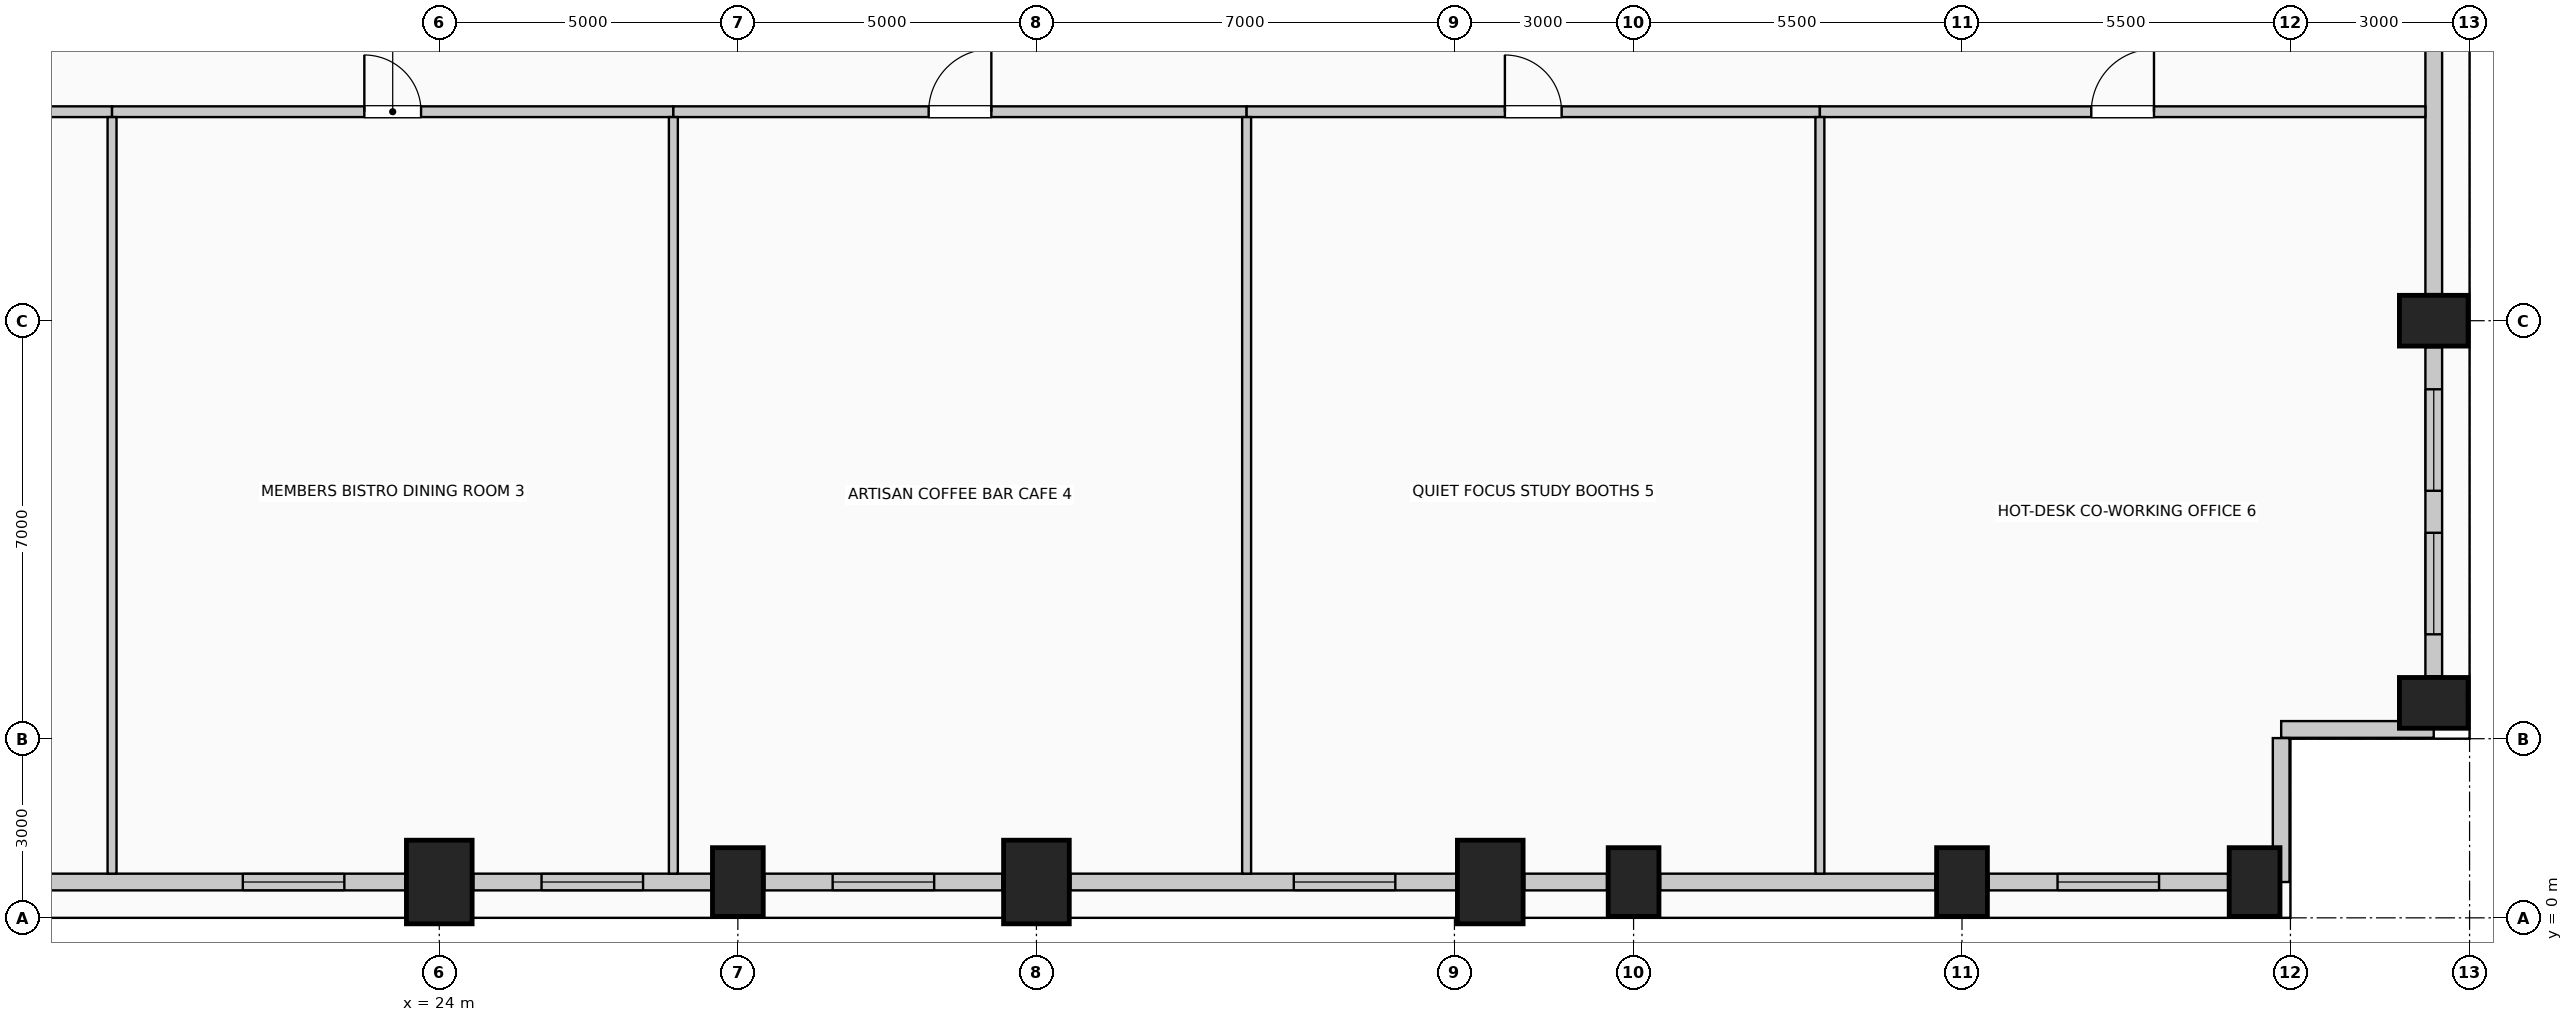
"""IFC4 building model, lengths in metres.
Left out: names, types, materials, properties, quantities, classifications, styles, units other than length and angle.
Written with IfcOpenShell. Run it as: python <this file> out.ifc"""

import sys

from ifc_helpers import new_model, si_unit, direction, frame, frame_2d, origin, origin_2d, place, context, subcontext, project, spatial, rectangle, extrude, element, fill, save


model = new_model("IFC4")
c1 = context("Model", 3, precision=1e-05, world=origin(), true_north=direction((0.0, 1.0)))
c2 = subcontext(c1, "Body", "Model", "MODEL_VIEW")
j1 = project(units=[si_unit("LENGTHUNIT", "METRE"), si_unit("PLANEANGLEUNIT", "RADIAN")], contexts=[c1])
p1 = place(None, origin())
s1 = spatial("IfcSite", under=j1, at=p1, CompositionType="ELEMENT")
p2 = place(p1, origin())
s2 = spatial("IfcBuilding", under=s1, at=p2, CompositionType="ELEMENT")
p3 = place(p2, frame((0.0, 0.0, 104.6)))
s3 = spatial("IfcBuildingStorey", under=s2, at=p3, CompositionType="ELEMENT", Elevation=104.6)
p4 = place(p3, frame((24.0, 0.6, 0.0), z_axis=(0.0, 0.0, 1.0), x_axis=(1.0, 0.0, 0.0)))
e1 = element("IfcColumn", 1, at=p4, inside=s3, PredefinedType="COLUMN", context=c2, shape_type="SweptSolid", body=[
    extrude(rectangle(XDim=1.1, YDim=1.4, at=origin_2d()), origin(), (0.0, 0.0, 1.0), 4.0),
])
p5 = place(p3, frame((29.0, 0.6, 0.0), z_axis=(0.0, 0.0, 1.0), x_axis=(1.0, 0.0, 0.0)))
e2 = element("IfcColumn", 2, at=p5, inside=s3, PredefinedType="COLUMN", context=c2, shape_type="SweptSolid", body=[
    extrude(rectangle(XDim=0.85, YDim=1.15, at=origin_2d()), origin(), (0.0, 0.0, 1.0), 4.0),
])
for number, where, z_axis, x_axis in (
    (3, (34.0, 0.6, 0.0), (0.0, 0.0, 1.0), (1.0, 0.0, 0.0)),
    (4, (41.6, 0.6, 0.0), (0.0, 0.0, 1.0), (1.0, 0.0, 0.0)),
):
    element("IfcColumn", number, at=place(p3, frame(where, z_axis=z_axis, x_axis=x_axis)), inside=s3, PredefinedType="COLUMN", context=c2, shape_type="SweptSolid", body=[
        extrude(rectangle(XDim=1.1, YDim=1.4, at=origin_2d()), origin(), (0.0, 0.0, 1.0), 4.0),
    ])
for number, where, z_axis, x_axis in (
    (5, (44.0, 0.6, 0.0), (0.0, 0.0, 1.0), (1.0, 0.0, 0.0)),
    (6, (49.5, 0.6, 0.0), (0.0, 0.0, 1.0), (1.0, 0.0, 0.0)),
    (7, (54.4, 0.6, 0.0), (0.0, 0.0, 1.0), (1.0, 0.0, 0.0)),
    (8, (57.4, 3.6, 0.0), (0.0, 0.0, 1.0), (0.0, 1.0, 0.0)),
    (9, (57.4, 10.0, 0.0), (0.0, 0.0, 1.0), (0.0, 1.0, 0.0)),
):
    element("IfcColumn", number, at=place(p3, frame(where, z_axis=z_axis, x_axis=x_axis)), inside=s3, PredefinedType="COLUMN", context=c2, shape_type="SweptSolid", body=[
        extrude(rectangle(XDim=0.85, YDim=1.15, at=origin_2d()), origin(), (0.0, 0.0, 1.0), 4.0),
    ])
p6 = place(p3, frame((23.43, 0.6, 0.0), z_axis=(0.0, 0.0, 1.0), x_axis=(-1.0, 0.0, 0.0)))
e10 = element("IfcWall", 10, at=p6, inside=s3, PredefinedType="SOLIDWALL", context=c2, shape_type="SweptSolid", body=[
    extrude(rectangle(XDim=6.46, YDim=0.28, at=frame_2d((3.23, 0.0))), origin(), (0.0, 0.0, 1.0), 2.875),
])
p7 = place(p6, frame((1.02, 0.0, 0.5)))
e11 = element("IfcOpeningElement", 11, at=p7, cuts=e10, PredefinedType="OPENING", context=c2, shape_type="SweptSolid", body=[
    extrude(rectangle(XDim=1.7, YDim=1.95, at=frame_2d((0.85, 0.975))), frame((0.0, 0.15, 0.0), z_axis=(0.0, -1.0, 0.0), x_axis=(1.0, 0.0, 0.0)), (0.0, 0.0, 1.0), 0.3),
])
p8 = place(p3, frame((28.555, 0.6, 0.0), z_axis=(0.0, 0.0, 1.0), x_axis=(-1.0, 0.0, 0.0)))
e12 = element("IfcWall", 12, at=p8, inside=s3, PredefinedType="SOLIDWALL", context=c2, shape_type="SweptSolid", body=[
    extrude(rectangle(XDim=3.985, YDim=0.28, at=frame_2d((1.992, 0.0))), origin(), (0.0, 0.0, 1.0), 2.875),
])
p9 = place(p8, frame((1.143, 0.0, 0.5)))
e13 = element("IfcOpeningElement", 13, at=p9, cuts=e12, PredefinedType="OPENING", context=c2, shape_type="SweptSolid", body=[
    extrude(rectangle(XDim=1.7, YDim=1.95, at=frame_2d((0.85, 0.975))), frame((0.0, 0.15, 0.0), z_axis=(0.0, -1.0, 0.0), x_axis=(1.0, 0.0, 0.0)), (0.0, 0.0, 1.0), 0.3),
])
p10 = place(p3, frame((33.43, 0.6, 0.0), z_axis=(0.0, 0.0, 1.0), x_axis=(-1.0, 0.0, 0.0)))
e14 = element("IfcWall", 14, at=p10, inside=s3, PredefinedType="SOLIDWALL", context=c2, shape_type="SweptSolid", body=[
    extrude(rectangle(XDim=3.985, YDim=0.28, at=frame_2d((1.992, 0.0))), origin(), (0.0, 0.0, 1.0), 2.875),
])
p11 = place(p10, frame((1.143, 0.0, 0.5)))
e15 = element("IfcOpeningElement", 15, at=p11, cuts=e14, PredefinedType="OPENING", context=c2, shape_type="SweptSolid", body=[
    extrude(rectangle(XDim=1.7, YDim=1.95, at=frame_2d((0.85, 0.975))), frame((0.0, 0.15, 0.0), z_axis=(0.0, -1.0, 0.0), x_axis=(1.0, 0.0, 0.0)), (0.0, 0.0, 1.0), 0.3),
])
p12 = place(p3, frame((41.03, 0.6, 0.0), z_axis=(0.0, 0.0, 1.0), x_axis=(-1.0, 0.0, 0.0)))
e16 = element("IfcWall", 16, at=p12, inside=s3, PredefinedType="SOLIDWALL", context=c2, shape_type="SweptSolid", body=[
    extrude(rectangle(XDim=6.46, YDim=0.28, at=frame_2d((3.23, 0.0))), origin(), (0.0, 0.0, 1.0), 2.875),
])
p13 = place(p12, frame((1.02, 0.0, 0.5)))
e17 = element("IfcOpeningElement", 17, at=p13, cuts=e16, PredefinedType="OPENING", context=c2, shape_type="SweptSolid", body=[
    extrude(rectangle(XDim=1.7, YDim=1.95, at=frame_2d((0.85, 0.975))), frame((0.0, 0.15, 0.0), z_axis=(0.0, -1.0, 0.0), x_axis=(1.0, 0.0, 0.0)), (0.0, 0.0, 1.0), 0.3),
])
p14 = place(p3, frame((43.555, 0.6, 0.0), z_axis=(0.0, 0.0, 1.0), x_axis=(-1.0, 0.0, 0.0)))
e18 = element("IfcWall", 18, at=p14, inside=s3, PredefinedType="SOLIDWALL", context=c2, shape_type="SweptSolid", body=[
    extrude(rectangle(XDim=1.385, YDim=0.28, at=frame_2d((0.692, 0.0))), origin(), (0.0, 0.0, 1.0), 2.875),
])
p15 = place(p3, frame((49.055, 0.6, 0.0), z_axis=(0.0, 0.0, 1.0), x_axis=(-1.0, 0.0, 0.0)))
e19 = element("IfcWall", 19, at=p15, inside=s3, PredefinedType="SOLIDWALL", context=c2, shape_type="SweptSolid", body=[
    extrude(rectangle(XDim=4.61, YDim=0.28, at=frame_2d((2.305, 0.0))), origin(), (0.0, 0.0, 1.0), 2.875),
])
p16 = place(p3, frame((53.955, 0.6, 0.0), z_axis=(0.0, 0.0, 1.0), x_axis=(-1.0, 0.0, 0.0)))
e20 = element("IfcWall", 20, at=p16, inside=s3, PredefinedType="SOLIDWALL", context=c2, shape_type="SweptSolid", body=[
    extrude(rectangle(XDim=4.01, YDim=0.28, at=frame_2d((2.005, 0.0))), origin(), (0.0, 0.0, 1.0), 2.875),
])
p17 = place(p16, frame((1.155, 0.0, 0.5)))
e21 = element("IfcOpeningElement", 21, at=p17, cuts=e20, PredefinedType="OPENING", context=c2, shape_type="SweptSolid", body=[
    extrude(rectangle(XDim=1.7, YDim=1.95, at=frame_2d((0.85, 0.975))), frame((0.0, 0.15, 0.0), z_axis=(0.0, -1.0, 0.0), x_axis=(1.0, 0.0, 0.0)), (0.0, 0.0, 1.0), 0.3),
])
p18 = place(p3, frame((57.4, 9.555, 0.0), z_axis=(0.0, 0.0, 1.0), x_axis=(0.0, -1.0, 0.0)))
e22 = element("IfcWall", 22, at=p18, inside=s3, PredefinedType="SOLIDWALL", context=c2, shape_type="SweptSolid", body=[
    extrude(rectangle(XDim=5.51, YDim=0.28, at=frame_2d((2.755, 0.0))), origin(), (0.0, 0.0, 1.0), 2.875),
])
p19 = place(p18, frame((0.703, 0.0, 0.5)))
e23 = element("IfcOpeningElement", 23, at=p19, cuts=e22, PredefinedType="OPENING", context=c2, shape_type="SweptSolid", body=[
    extrude(rectangle(XDim=1.7, YDim=1.95, at=frame_2d((0.85, 0.975))), frame((0.0, 0.15, 0.0), z_axis=(0.0, -1.0, 0.0), x_axis=(1.0, 0.0, 0.0)), (0.0, 0.0, 1.0), 0.3),
])
p20 = place(p18, frame((3.107, 0.0, 0.5)))
e24 = element("IfcOpeningElement", 24, at=p20, cuts=e22, PredefinedType="OPENING", context=c2, shape_type="SweptSolid", body=[
    extrude(rectangle(XDim=1.7, YDim=1.95, at=frame_2d((0.85, 0.975))), frame((0.0, 0.15, 0.0), z_axis=(0.0, -1.0, 0.0), x_axis=(1.0, 0.0, 0.0)), (0.0, 0.0, 1.0), 0.3),
])
p21 = place(p3, frame((57.4, 17.555, 0.0), z_axis=(0.0, 0.0, 1.0), x_axis=(0.0, -1.0, 0.0)))
e25 = element("IfcWall", 25, at=p21, inside=s3, PredefinedType="SOLIDWALL", context=c2, shape_type="SweptSolid", body=[
    extrude(rectangle(XDim=7.11, YDim=0.28, at=frame_2d((3.555, 0.0))), origin(), (0.0, 0.0, 1.0), 2.875),
])
p22 = place(p3, frame((57.4, 3.155, 0.0), z_axis=(0.0, 0.0, 1.0), x_axis=(-1.0, 0.0, 0.0)))
e26 = element("IfcWall", 26, at=p22, inside=s3, PredefinedType="SOLIDWALL", context=c2, shape_type="SweptSolid", body=[
    extrude(rectangle(XDim=2.555, YDim=0.28, at=frame_2d((1.277, 0.0))), origin(), (0.0, 0.0, 1.0), 3.725),
])
p23 = place(p3, frame((54.845, 3.01, 0.0), z_axis=(0.0, 0.0, 1.0), x_axis=(0.0, -1.0, 0.0)))
e27 = element("IfcWall", 27, at=p23, inside=s3, PredefinedType="SOLIDWALL", context=c2, shape_type="SweptSolid", body=[
    extrude(rectangle(XDim=2.41, YDim=0.28, at=frame_2d((1.205, 0.0))), origin(), (0.0, 0.0, 1.0), 3.725),
])
p24 = place(p3, frame((8.5, 13.5, 0.0), z_axis=(0.0, 0.0, 1.0), x_axis=(1.0, 0.0, 0.0)))
e28 = element("IfcWall", 28, at=p24, inside=s3, PredefinedType="PARTITIONING", context=c2, shape_type="SweptSolid", body=[
    extrude(rectangle(XDim=10.02, YDim=0.18, at=frame_2d((5.01, 0.0))), origin(), (0.0, 0.0, 1.0), 3.725),
])
p25 = place(p24, frame((4.485, 0.0, 0.0)))
e29 = element("IfcOpeningElement", 29, at=p25, cuts=e28, PredefinedType="OPENING", context=c2, shape_type="SweptSolid", body=[
    extrude(rectangle(XDim=1.05, YDim=2.15, at=frame_2d((0.525, 1.075))), frame((0.0, 0.1, 0.0), z_axis=(0.0, -1.0, 0.0), x_axis=(1.0, 0.0, 0.0)), (0.0, 0.0, 1.0), 0.2),
])
p26 = place(p3, frame((18.52, 13.5, 0.0), z_axis=(0.0, 0.0, 1.0), x_axis=(1.0, 0.0, 0.0)))
e30 = element("IfcWall", 30, at=p26, inside=s3, PredefinedType="PARTITIONING", context=c2, shape_type="SweptSolid", body=[
    extrude(rectangle(XDim=9.4, YDim=0.18, at=frame_2d((4.7, 0.0))), origin(), (0.0, 0.0, 1.0), 3.725),
])
p27 = place(p26, frame((4.225, 0.0, 0.0)))
e31 = element("IfcOpeningElement", 31, at=p27, cuts=e30, PredefinedType="OPENING", context=c2, shape_type="SweptSolid", body=[
    extrude(rectangle(XDim=0.95, YDim=2.15, at=frame_2d((0.475, 1.075))), frame((0.0, 0.1, 0.0), z_axis=(0.0, -1.0, 0.0), x_axis=(1.0, 0.0, 0.0)), (0.0, 0.0, 1.0), 0.2),
])
p28 = place(p3, frame((27.92, 13.5, 0.0), z_axis=(0.0, 0.0, 1.0), x_axis=(1.0, 0.0, 0.0)))
e32 = element("IfcWall", 32, at=p28, inside=s3, PredefinedType="PARTITIONING", context=c2, shape_type="SweptSolid", body=[
    extrude(rectangle(XDim=9.6, YDim=0.18, at=frame_2d((4.8, 0.0))), origin(), (0.0, 0.0, 1.0), 3.725),
])
p29 = place(p28, frame((4.275, 0.0, 0.0)))
e33 = element("IfcOpeningElement", 33, at=p29, cuts=e32, PredefinedType="OPENING", context=c2, shape_type="SweptSolid", body=[
    extrude(rectangle(XDim=1.05, YDim=2.15, at=frame_2d((0.525, 1.075))), frame((0.0, 0.1, 0.0), z_axis=(0.0, -1.0, 0.0), x_axis=(1.0, 0.0, 0.0)), (0.0, 0.0, 1.0), 0.2),
])
p30 = place(p3, frame((37.52, 13.5, 0.0), z_axis=(0.0, 0.0, 1.0), x_axis=(1.0, 0.0, 0.0)))
e34 = element("IfcWall", 34, at=p30, inside=s3, PredefinedType="PARTITIONING", context=c2, shape_type="SweptSolid", body=[
    extrude(rectangle(XDim=9.6, YDim=0.18, at=frame_2d((4.8, 0.0))), origin(), (0.0, 0.0, 1.0), 3.725),
])
p31 = place(p30, frame((4.325, 0.0, 0.0)))
e35 = element("IfcOpeningElement", 35, at=p31, cuts=e34, PredefinedType="OPENING", context=c2, shape_type="SweptSolid", body=[
    extrude(rectangle(XDim=0.95, YDim=2.15, at=frame_2d((0.475, 1.075))), frame((0.0, 0.1, 0.0), z_axis=(0.0, -1.0, 0.0), x_axis=(1.0, 0.0, 0.0)), (0.0, 0.0, 1.0), 0.2),
])
p32 = place(p3, frame((47.12, 13.5, 0.0), z_axis=(0.0, 0.0, 1.0), x_axis=(1.0, 0.0, 0.0)))
e36 = element("IfcWall", 36, at=p32, inside=s3, PredefinedType="PARTITIONING", context=c2, shape_type="SweptSolid", body=[
    extrude(rectangle(XDim=10.14, YDim=0.18, at=frame_2d((5.07, 0.0))), origin(), (0.0, 0.0, 1.0), 3.725),
])
p33 = place(p32, frame((4.545, 0.0, 0.0)))
e37 = element("IfcOpeningElement", 37, at=p33, cuts=e36, PredefinedType="OPENING", context=c2, shape_type="SweptSolid", body=[
    extrude(rectangle(XDim=1.05, YDim=2.15, at=frame_2d((0.525, 1.075))), frame((0.0, 0.1, 0.0), z_axis=(0.0, -1.0, 0.0), x_axis=(1.0, 0.0, 0.0)), (0.0, 0.0, 1.0), 0.2),
])
for number, where, z_axis, x_axis in (
    (38, (18.52, 0.74, 0.0), (0.0, 0.0, 1.0), (0.0, 1.0, 0.0)),
    (39, (27.92, 0.74, 0.0), (0.0, 0.0, 1.0), (0.0, 1.0, 0.0)),
    (40, (37.52, 0.74, 0.0), (0.0, 0.0, 1.0), (0.0, 1.0, 0.0)),
    (41, (47.12, 0.74, 0.0), (0.0, 0.0, 1.0), (0.0, 1.0, 0.0)),
):
    element("IfcWall", number, at=place(p3, frame(where, z_axis=z_axis, x_axis=x_axis)), inside=s3, PredefinedType="PARTITIONING", context=c2, shape_type="SweptSolid", body=[
        extrude(rectangle(XDim=12.67, YDim=0.15, at=frame_2d((6.335, 0.0))), origin(), (0.0, 0.0, 1.0), 3.725),
    ])
p34 = place(p7, origin())
e42 = element("IfcWindow", 42, at=p34, inside=s3, PartitioningType="SINGLE_PANEL", PredefinedType="WINDOW", context=c2, shape_type="SweptSolid", body=[
    extrude(rectangle(XDim=1.7, YDim=1.95, at=frame_2d((0.85, 0.975))), frame((0.0, 0.03, 0.0), z_axis=(0.0, -1.0, 0.0), x_axis=(1.0, 0.0, 0.0)), (0.0, 0.0, 1.0), 0.06),
])
fill(e11, e42)
p35 = place(p9, origin())
e43 = element("IfcWindow", 43, at=p35, inside=s3, PartitioningType="SINGLE_PANEL", PredefinedType="WINDOW", context=c2, shape_type="SweptSolid", body=[
    extrude(rectangle(XDim=1.7, YDim=1.95, at=frame_2d((0.85, 0.975))), frame((0.0, 0.03, 0.0), z_axis=(0.0, -1.0, 0.0), x_axis=(1.0, 0.0, 0.0)), (0.0, 0.0, 1.0), 0.06),
])
fill(e13, e43)
p36 = place(p11, origin())
e44 = element("IfcWindow", 44, at=p36, inside=s3, PartitioningType="SINGLE_PANEL", PredefinedType="WINDOW", context=c2, shape_type="SweptSolid", body=[
    extrude(rectangle(XDim=1.7, YDim=1.95, at=frame_2d((0.85, 0.975))), frame((0.0, 0.03, 0.0), z_axis=(0.0, -1.0, 0.0), x_axis=(1.0, 0.0, 0.0)), (0.0, 0.0, 1.0), 0.06),
])
fill(e15, e44)
p37 = place(p13, origin())
e45 = element("IfcWindow", 45, at=p37, inside=s3, PartitioningType="SINGLE_PANEL", PredefinedType="WINDOW", context=c2, shape_type="SweptSolid", body=[
    extrude(rectangle(XDim=1.7, YDim=1.95, at=frame_2d((0.85, 0.975))), frame((0.0, 0.03, 0.0), z_axis=(0.0, -1.0, 0.0), x_axis=(1.0, 0.0, 0.0)), (0.0, 0.0, 1.0), 0.06),
])
fill(e17, e45)
p38 = place(p17, origin())
e46 = element("IfcWindow", 46, at=p38, inside=s3, PartitioningType="SINGLE_PANEL", PredefinedType="WINDOW", context=c2, shape_type="SweptSolid", body=[
    extrude(rectangle(XDim=1.7, YDim=1.95, at=frame_2d((0.85, 0.975))), frame((0.0, 0.03, 0.0), z_axis=(0.0, -1.0, 0.0), x_axis=(1.0, 0.0, 0.0)), (0.0, 0.0, 1.0), 0.06),
])
fill(e21, e46)
p39 = place(p19, origin())
e47 = element("IfcWindow", 47, at=p39, inside=s3, PartitioningType="SINGLE_PANEL", PredefinedType="WINDOW", context=c2, shape_type="SweptSolid", body=[
    extrude(rectangle(XDim=1.7, YDim=1.95, at=frame_2d((0.85, 0.975))), frame((0.0, 0.03, 0.0), z_axis=(0.0, -1.0, 0.0), x_axis=(1.0, 0.0, 0.0)), (0.0, 0.0, 1.0), 0.06),
])
fill(e23, e47)
p40 = place(p20, origin())
e48 = element("IfcWindow", 48, at=p40, inside=s3, PartitioningType="SINGLE_PANEL", PredefinedType="WINDOW", context=c2, shape_type="SweptSolid", body=[
    extrude(rectangle(XDim=1.7, YDim=1.95, at=frame_2d((0.85, 0.975))), frame((0.0, 0.03, 0.0), z_axis=(0.0, -1.0, 0.0), x_axis=(1.0, 0.0, 0.0)), (0.0, 0.0, 1.0), 0.06),
])
fill(e24, e48)
p41 = place(p27, origin())
e49 = element("IfcDoor", 49, at=p41, inside=s3, OperationType="SINGLE_SWING_LEFT", PredefinedType="DOOR", context=c2, shape_type="SweptSolid", body=[
    extrude(rectangle(XDim=0.95, YDim=2.15, at=frame_2d((0.475, 1.075))), frame((0.0, 0.025, 0.0), z_axis=(0.0, -1.0, 0.0), x_axis=(1.0, 0.0, 0.0)), (0.0, 0.0, 1.0), 0.05),
])
fill(e31, e49)
p42 = place(p29, origin())
e50 = element("IfcDoor", 50, at=p42, inside=s3, OperationType="SINGLE_SWING_RIGHT", PredefinedType="DOOR", context=c2, shape_type="SweptSolid", body=[
    extrude(rectangle(XDim=1.05, YDim=2.15, at=frame_2d((0.525, 1.075))), frame((0.0, 0.025, 0.0), z_axis=(0.0, -1.0, 0.0), x_axis=(1.0, 0.0, 0.0)), (0.0, 0.0, 1.0), 0.05),
])
fill(e33, e50)
p43 = place(p31, origin())
e51 = element("IfcDoor", 51, at=p43, inside=s3, OperationType="SINGLE_SWING_LEFT", PredefinedType="DOOR", context=c2, shape_type="SweptSolid", body=[
    extrude(rectangle(XDim=0.95, YDim=2.15, at=frame_2d((0.475, 1.075))), frame((0.0, 0.025, 0.0), z_axis=(0.0, -1.0, 0.0), x_axis=(1.0, 0.0, 0.0)), (0.0, 0.0, 1.0), 0.05),
])
fill(e35, e51)
p44 = place(p33, origin())
e52 = element("IfcDoor", 52, at=p44, inside=s3, OperationType="SINGLE_SWING_RIGHT", PredefinedType="DOOR", context=c2, shape_type="SweptSolid", body=[
    extrude(rectangle(XDim=1.05, YDim=2.15, at=frame_2d((0.525, 1.075))), frame((0.0, 0.025, 0.0), z_axis=(0.0, -1.0, 0.0), x_axis=(1.0, 0.0, 0.0)), (0.0, 0.0, 1.0), 0.05),
])
fill(e37, e52)
save(model, sys.argv[1])
